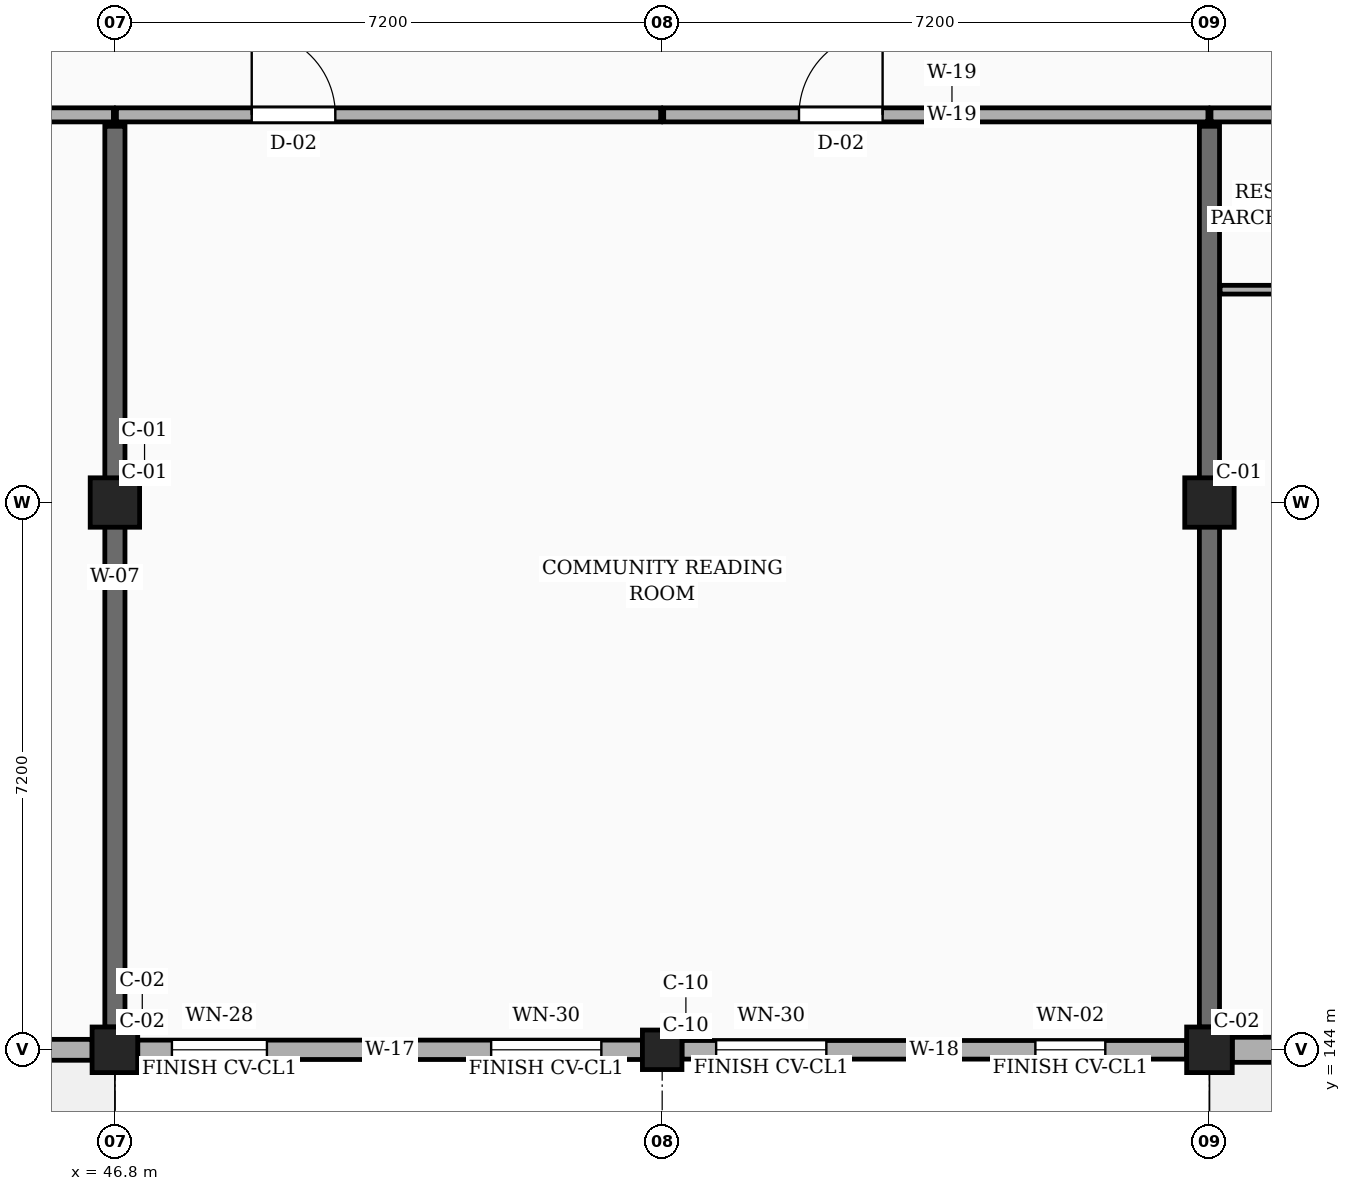
"""IFC4 building model, lengths in metres.
Left out: names, types, materials, properties, quantities, classifications, styles, units other than length and angle.
Written with IfcOpenShell. Run it as: python <this file> out.ifc"""

import sys

from ifc_helpers import new_model, si_unit, direction, frame, frame_2d, origin, origin_2d, place, context, subcontext, project, spatial, rectangle, circle, extrude, element, fill, save


model = new_model("IFC4")
c1 = context("Model", 3, precision=1e-05, world=origin(), true_north=direction((0.0, 1.0)))
c2 = subcontext(c1, "Body", "Model", "MODEL_VIEW")
j1 = project(units=[si_unit("LENGTHUNIT", "METRE"), si_unit("PLANEANGLEUNIT", "RADIAN")], contexts=[c1])
p1 = place(None, origin())
s1 = spatial("IfcSite", under=j1, at=p1, CompositionType="ELEMENT")
p2 = place(p1, origin())
s2 = spatial("IfcBuilding", under=s1, at=p2, CompositionType="ELEMENT")
p3 = place(p2, origin())
s3 = spatial("IfcBuildingStorey", under=s2, at=p3, CompositionType="ELEMENT", Elevation=0.0)
p4 = place(p3, frame((46.8, 144.0, 0.0), z_axis=(0.0, 0.0, 1.0), x_axis=(1.0, 0.0, 0.0)))
e1 = element("IfcColumn", 1, at=p4, inside=s3, PredefinedType="COLUMN", context=c2, shape_type="SweptSolid", body=[
    extrude(rectangle(XDim=0.6, YDim=0.6, at=origin_2d()), origin(), (0.0, 0.0, 1.0), 4.5),
])
p5 = place(p3, frame((46.8, 151.2, 0.0), z_axis=(0.0, 0.0, 1.0), x_axis=(1.0, 0.0, 0.0)))
e2 = element("IfcColumn", 2, at=p5, inside=s3, PredefinedType="COLUMN", context=c2, shape_type="SweptSolid", body=[
    extrude(rectangle(XDim=0.65, YDim=0.65, at=origin_2d()), origin(), (0.0, 0.0, 1.0), 4.5),
])
p6 = place(p3, frame((54.0, 144.0, 0.0), z_axis=(0.0, 0.0, 1.0), x_axis=(1.0, 0.0, 0.0)))
e3 = element("IfcColumn", 3, at=p6, inside=s3, PredefinedType="COLUMN", context=c2, shape_type="SweptSolid", body=[
    extrude(circle(Radius=0.26, at=origin_2d()), origin(), (0.0, 0.0, 1.0), 4.5),
])
p7 = place(p3, frame((61.2, 144.0, 0.0), z_axis=(0.0, 0.0, 1.0), x_axis=(1.0, 0.0, 0.0)))
e4 = element("IfcColumn", 4, at=p7, inside=s3, PredefinedType="COLUMN", context=c2, shape_type="SweptSolid", body=[
    extrude(rectangle(XDim=0.6, YDim=0.6, at=origin_2d()), origin(), (0.0, 0.0, 1.0), 4.5),
])
p8 = place(p3, frame((61.2, 151.2, 0.0), z_axis=(0.0, 0.0, 1.0), x_axis=(1.0, 0.0, 0.0)))
e5 = element("IfcColumn", 5, at=p8, inside=s3, PredefinedType="COLUMN", context=c2, shape_type="SweptSolid", body=[
    extrude(rectangle(XDim=0.65, YDim=0.65, at=origin_2d()), origin(), (0.0, 0.0, 1.0), 4.5),
])
for number, where, z_axis, x_axis in (
    (6, (46.8, 144.3, 0.0), (0.0, 0.0, 1.0), (0.0, 1.0, 0.0)),
    (7, (61.2, 144.3, 0.0), (0.0, 0.0, 1.0), (0.0, 1.0, 0.0)),
):
    element("IfcWall", number, at=place(p3, frame(where, z_axis=z_axis, x_axis=x_axis)), inside=s3, PredefinedType="SOLIDWALL", context=c2, shape_type="SweptSolid", body=[
        extrude(rectangle(XDim=11.85, YDim=0.265, at=frame_2d((5.925, 0.0))), origin(), (0.0, 0.0, 1.0), 3.535),
    ])
p9 = place(p3, frame((39.9, 144.0, 0.0), z_axis=(0.0, 0.0, 1.0), x_axis=(1.0, 0.0, 0.0)))
e8 = element("IfcWall", 8, at=p9, inside=s3, PredefinedType="SOLIDWALL", context=c2, shape_type="SweptSolid", body=[
    extrude(rectangle(XDim=6.6, YDim=0.275, at=frame_2d((3.3, 0.0))), origin(), (0.0, 0.0, 1.0), 3.805),
])
p10 = place(p9, frame((2.4, 0.0, 0.0)))
e9 = element("IfcOpeningElement", 9, at=p10, cuts=e8, PredefinedType="OPENING", context=c2, shape_type="SweptSolid", body=[
    extrude(rectangle(XDim=1.8, YDim=2.2, at=frame_2d((0.9, 1.1))), frame((0.0, 0.147, 0.0), z_axis=(0.0, -1.0, 0.0), x_axis=(1.0, 0.0, 0.0)), (0.0, 0.0, 1.0), 0.295),
])
p11 = place(p3, frame((47.1, 144.0, 0.0), z_axis=(0.0, 0.0, 1.0), x_axis=(1.0, 0.0, 0.0)))
e10 = element("IfcWall", 10, at=p11, inside=s3, PredefinedType="SOLIDWALL", context=c2, shape_type="SweptSolid", body=[
    extrude(rectangle(XDim=6.64, YDim=0.255, at=frame_2d((3.32, 0.0))), origin(), (0.0, 0.0, 1.0), 3.805),
])
p12 = place(p11, frame((0.45, 0.0, 0.78)))
e11 = element("IfcOpeningElement", 11, at=p12, cuts=e10, PredefinedType="OPENING", context=c2, shape_type="SweptSolid", body=[
    extrude(rectangle(XDim=1.25, YDim=1.44, at=frame_2d((0.625, 0.72))), frame((0.0, 0.137, 0.0), z_axis=(0.0, -1.0, 0.0), x_axis=(1.0, 0.0, 0.0)), (0.0, 0.0, 1.0), 0.275),
])
p13 = place(p11, frame((4.65, 0.0, 0.78)))
e12 = element("IfcOpeningElement", 12, at=p13, cuts=e10, PredefinedType="OPENING", context=c2, shape_type="SweptSolid", body=[
    extrude(rectangle(XDim=1.45, YDim=1.44, at=frame_2d((0.725, 0.72))), frame((0.0, 0.137, 0.0), z_axis=(0.0, -1.0, 0.0), x_axis=(1.0, 0.0, 0.0)), (0.0, 0.0, 1.0), 0.275),
])
p14 = place(p3, frame((54.26, 144.0, 0.0), z_axis=(0.0, 0.0, 1.0), x_axis=(1.0, 0.0, 0.0)))
e13 = element("IfcWall", 13, at=p14, inside=s3, PredefinedType="SOLIDWALL", context=c2, shape_type="SweptSolid", body=[
    extrude(rectangle(XDim=6.64, YDim=0.245, at=frame_2d((3.32, 0.0))), origin(), (0.0, 0.0, 1.0), 3.805),
])
p15 = place(p14, frame((0.45, 0.0, 0.78)))
e14 = element("IfcOpeningElement", 14, at=p15, cuts=e13, PredefinedType="OPENING", context=c2, shape_type="SweptSolid", body=[
    extrude(rectangle(XDim=1.45, YDim=1.44, at=frame_2d((0.725, 0.72))), frame((0.0, 0.133, 0.0), z_axis=(0.0, -1.0, 0.0), x_axis=(1.0, 0.0, 0.0)), (0.0, 0.0, 1.0), 0.265),
])
p16 = place(p14, frame((4.65, 0.0, 0.78)))
e15 = element("IfcOpeningElement", 15, at=p16, cuts=e13, PredefinedType="OPENING", context=c2, shape_type="SweptSolid", body=[
    extrude(rectangle(XDim=0.92, YDim=1.15, at=frame_2d((0.46, 0.575))), frame((0.0, 0.133, 0.0), z_axis=(0.0, -1.0, 0.0), x_axis=(1.0, 0.0, 0.0)), (0.0, 0.0, 1.0), 0.265),
])
p17 = place(p3, frame((61.5, 144.0, 0.0), z_axis=(0.0, 0.0, 1.0), x_axis=(1.0, 0.0, 0.0)))
e16 = element("IfcWall", 16, at=p17, inside=s3, PredefinedType="SOLIDWALL", context=c2, shape_type="SweptSolid", body=[
    extrude(rectangle(XDim=6.6, YDim=0.33, at=frame_2d((3.3, 0.0))), origin(), (0.0, 0.0, 1.0), 3.805),
])
p18 = place(p17, frame((2.3, 0.0, 0.0)))
e17 = element("IfcOpeningElement", 17, at=p18, cuts=e16, PredefinedType="OPENING", context=c2, shape_type="SweptSolid", body=[
    extrude(rectangle(XDim=2.0, YDim=2.3, at=frame_2d((1.0, 1.15))), frame((0.0, 0.175, 0.0), z_axis=(0.0, -1.0, 0.0), x_axis=(1.0, 0.0, 0.0)), (0.0, 0.0, 1.0), 0.35),
])
p19 = place(p3, frame((39.62, 156.3, 0.0), z_axis=(0.0, 0.0, 1.0), x_axis=(1.0, 0.0, 0.0)))
e18 = element("IfcWall", 18, at=p19, inside=s3, PredefinedType="PARTITIONING", context=c2, shape_type="SweptSolid", body=[
    extrude(rectangle(XDim=7.16, YDim=0.185, at=frame_2d((3.58, 0.0))), origin(), (0.0, 0.0, 1.0), 3.67),
])
p20 = place(p19, frame((4.33, 0.0, 0.0)))
e19 = element("IfcOpeningElement", 19, at=p20, cuts=e18, PredefinedType="OPENING", context=c2, shape_type="SweptSolid", body=[
    extrude(rectangle(XDim=1.1, YDim=2.15, at=frame_2d((0.55, 1.075))), frame((0.0, 0.103, 0.0), z_axis=(0.0, -1.0, 0.0), x_axis=(1.0, 0.0, 0.0)), (0.0, 0.0, 1.0), 0.205),
])
p21 = place(p3, frame((46.82, 156.3, 0.0), z_axis=(0.0, 0.0, 1.0), x_axis=(1.0, 0.0, 0.0)))
e20 = element("IfcWall", 20, at=p21, inside=s3, PredefinedType="PARTITIONING", context=c2, shape_type="SweptSolid", body=[
    extrude(rectangle(XDim=7.16, YDim=0.185, at=frame_2d((3.58, 0.0))), origin(), (0.0, 0.0, 1.0), 3.67),
])
p22 = place(p21, frame((1.78, 0.0, 0.0)))
e21 = element("IfcOpeningElement", 21, at=p22, cuts=e20, PredefinedType="OPENING", context=c2, shape_type="SweptSolid", body=[
    extrude(rectangle(XDim=1.1, YDim=2.15, at=frame_2d((0.55, 1.075))), frame((0.0, 0.103, 0.0), z_axis=(0.0, -1.0, 0.0), x_axis=(1.0, 0.0, 0.0)), (0.0, 0.0, 1.0), 0.205),
])
p23 = place(p3, frame((54.02, 156.3, 0.0), z_axis=(0.0, 0.0, 1.0), x_axis=(1.0, 0.0, 0.0)))
e22 = element("IfcWall", 22, at=p23, inside=s3, PredefinedType="PARTITIONING", context=c2, shape_type="SweptSolid", body=[
    extrude(rectangle(XDim=7.16, YDim=0.185, at=frame_2d((3.58, 0.0))), origin(), (0.0, 0.0, 1.0), 3.67),
])
p24 = place(p23, frame((1.78, 0.0, 0.0)))
e23 = element("IfcOpeningElement", 23, at=p24, cuts=e22, PredefinedType="OPENING", context=c2, shape_type="SweptSolid", body=[
    extrude(rectangle(XDim=1.1, YDim=2.15, at=frame_2d((0.55, 1.075))), frame((0.0, 0.103, 0.0), z_axis=(0.0, -1.0, 0.0), x_axis=(1.0, 0.0, 0.0)), (0.0, 0.0, 1.0), 0.205),
])
p25 = place(p3, frame((61.22, 156.3, 0.0), z_axis=(0.0, 0.0, 1.0), x_axis=(1.0, 0.0, 0.0)))
e24 = element("IfcWall", 24, at=p25, inside=s3, PredefinedType="PARTITIONING", context=c2, shape_type="SweptSolid", body=[
    extrude(rectangle(XDim=7.16, YDim=0.185, at=frame_2d((3.58, 0.0))), origin(), (0.0, 0.0, 1.0), 3.67),
])
p26 = place(p25, frame((4.33, 0.0, 0.0)))
e25 = element("IfcOpeningElement", 25, at=p26, cuts=e24, PredefinedType="OPENING", context=c2, shape_type="SweptSolid", body=[
    extrude(rectangle(XDim=1.1, YDim=2.15, at=frame_2d((0.55, 1.075))), frame((0.0, 0.103, 0.0), z_axis=(0.0, -1.0, 0.0), x_axis=(1.0, 0.0, 0.0)), (0.0, 0.0, 1.0), 0.205),
])
p27 = place(p3, frame((61.34, 154.0, 0.0), z_axis=(0.0, 0.0, 1.0), x_axis=(1.0, 0.0, 0.0)))
e26 = element("IfcWall", 26, at=p27, inside=s3, PredefinedType="PARTITIONING", context=c2, shape_type="SweptSolid", body=[
    extrude(rectangle(XDim=2.41, YDim=0.115, at=frame_2d((1.205, 0.0))), origin(), (0.0, 0.0, 1.0), 3.67),
])
p28 = place(p12, origin())
e27 = element("IfcWindow", 27, at=p28, inside=s3, PartitioningType="SINGLE_PANEL", PredefinedType="WINDOW", context=c2, shape_type="SweptSolid", body=[
    extrude(rectangle(XDim=1.25, YDim=1.44, at=frame_2d((0.625, 0.72))), frame((0.0, 0.03, 0.0), z_axis=(0.0, -1.0, 0.0), x_axis=(1.0, 0.0, 0.0)), (0.0, 0.0, 1.0), 0.06),
])
fill(e11, e27)
p29 = place(p13, origin())
e28 = element("IfcWindow", 28, at=p29, inside=s3, PartitioningType="SINGLE_PANEL", PredefinedType="WINDOW", context=c2, shape_type="SweptSolid", body=[
    extrude(rectangle(XDim=1.45, YDim=1.44, at=frame_2d((0.725, 0.72))), frame((0.0, 0.03, 0.0), z_axis=(0.0, -1.0, 0.0), x_axis=(1.0, 0.0, 0.0)), (0.0, 0.0, 1.0), 0.06),
])
fill(e12, e28)
p30 = place(p15, origin())
e29 = element("IfcWindow", 29, at=p30, inside=s3, PartitioningType="SINGLE_PANEL", PredefinedType="WINDOW", context=c2, shape_type="SweptSolid", body=[
    extrude(rectangle(XDim=1.45, YDim=1.44, at=frame_2d((0.725, 0.72))), frame((0.0, 0.03, 0.0), z_axis=(0.0, -1.0, 0.0), x_axis=(1.0, 0.0, 0.0)), (0.0, 0.0, 1.0), 0.06),
])
fill(e14, e29)
p31 = place(p16, origin())
e30 = element("IfcWindow", 30, at=p31, inside=s3, PartitioningType="SINGLE_PANEL", PredefinedType="WINDOW", context=c2, shape_type="SweptSolid", body=[
    extrude(rectangle(XDim=0.92, YDim=1.15, at=frame_2d((0.46, 0.575))), frame((0.0, 0.03, 0.0), z_axis=(0.0, -1.0, 0.0), x_axis=(1.0, 0.0, 0.0)), (0.0, 0.0, 1.0), 0.06),
])
fill(e15, e30)
p32 = place(p22, origin())
e31 = element("IfcDoor", 31, at=p32, inside=s3, OperationType="SINGLE_SWING_LEFT", PredefinedType="DOOR", context=c2, shape_type="SweptSolid", body=[
    extrude(rectangle(XDim=1.1, YDim=2.15, at=frame_2d((0.55, 1.075))), frame((0.0, 0.025, 0.0), z_axis=(0.0, -1.0, 0.0), x_axis=(1.0, 0.0, 0.0)), (0.0, 0.0, 1.0), 0.05),
])
fill(e21, e31)
p33 = place(p24, origin())
e32 = element("IfcDoor", 32, at=p33, inside=s3, OperationType="SINGLE_SWING_RIGHT", PredefinedType="DOOR", context=c2, shape_type="SweptSolid", body=[
    extrude(rectangle(XDim=1.1, YDim=2.15, at=frame_2d((0.55, 1.075))), frame((0.0, 0.025, 0.0), z_axis=(0.0, -1.0, 0.0), x_axis=(1.0, 0.0, 0.0)), (0.0, 0.0, 1.0), 0.05),
])
fill(e23, e32)
save(model, sys.argv[1])
